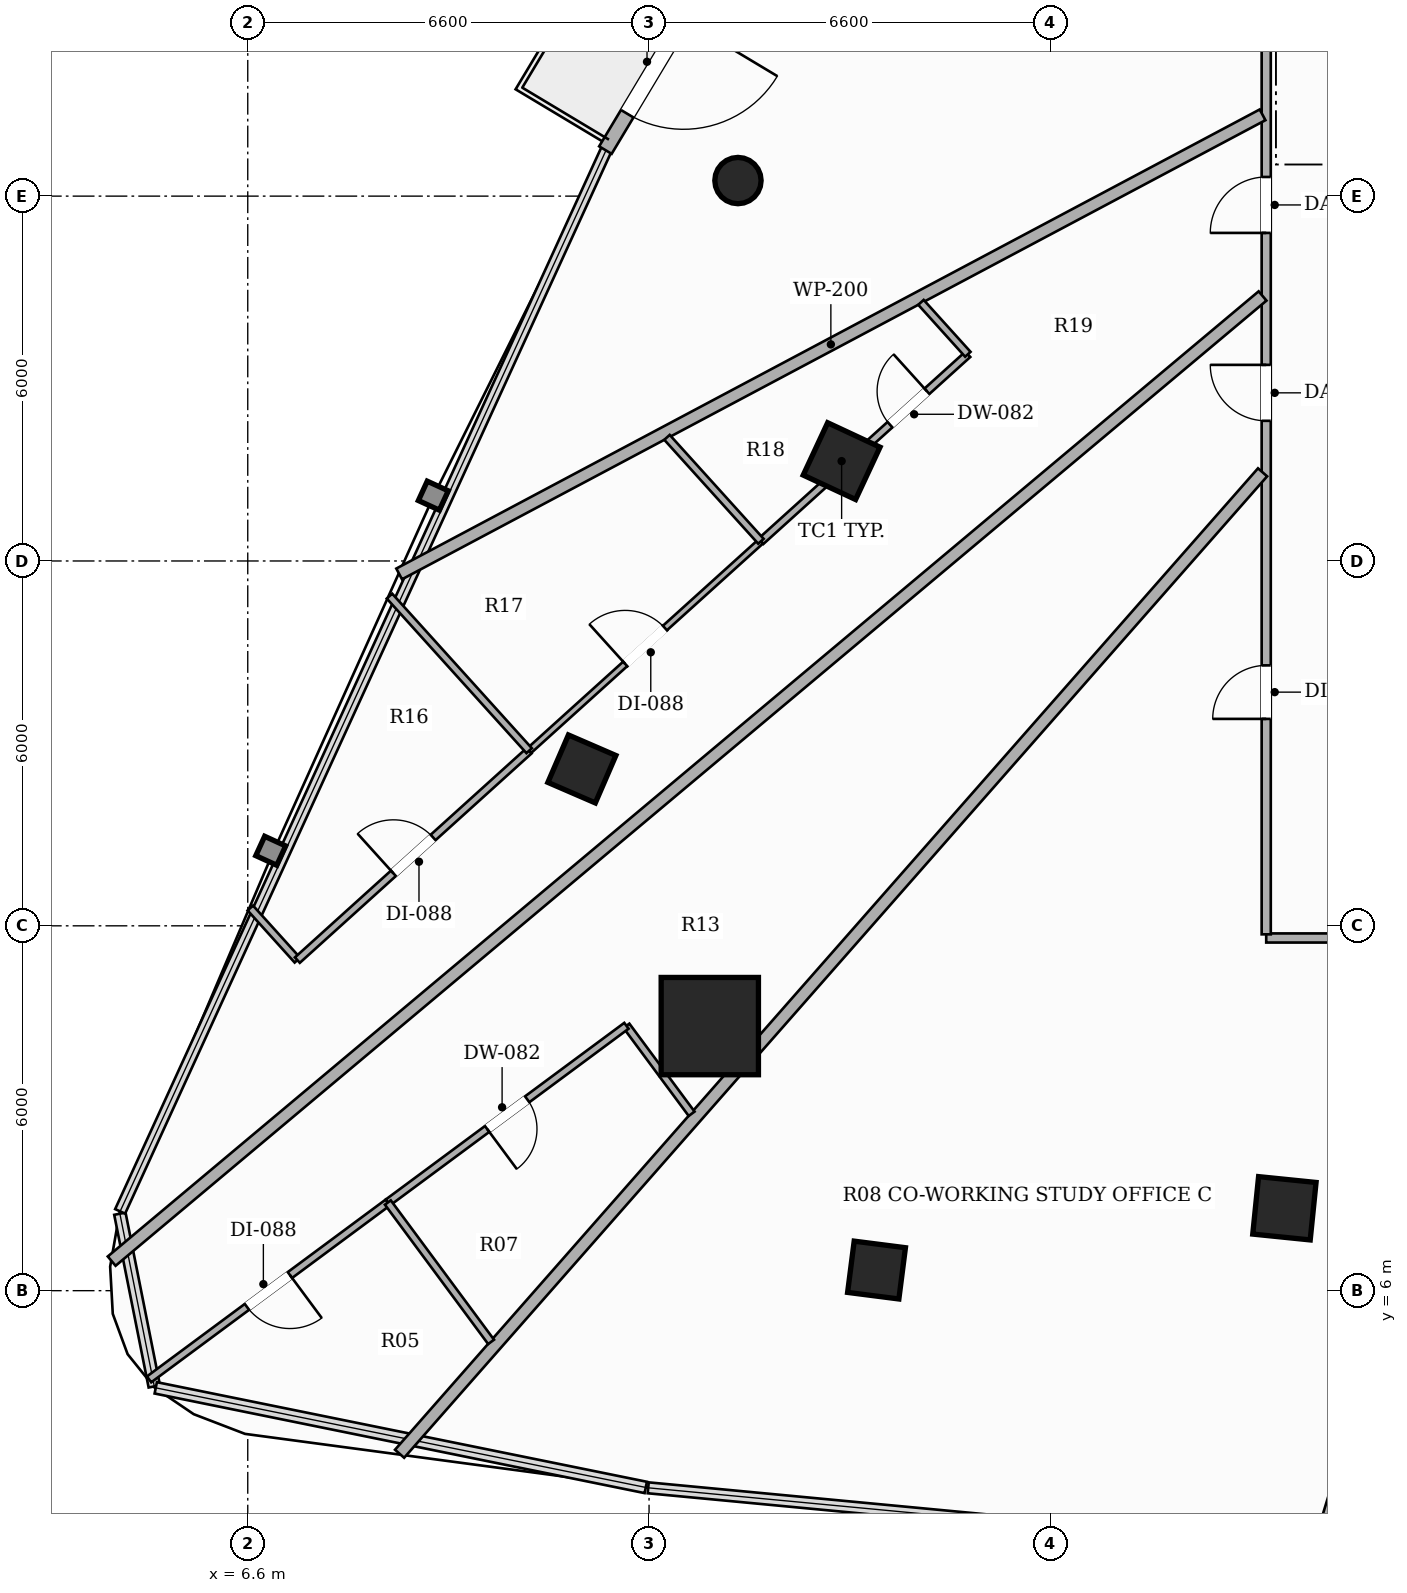
"""IFC4 building model, lengths in metres.
Left out: names, types, materials, properties, quantities, classifications, styles, units other than length and angle.
Written with IfcOpenShell. Run it as: python <this file> out.ifc"""

import sys

from ifc_helpers import new_model, si_unit, direction, frame, frame_2d, origin, origin_2d, place, context, subcontext, project, spatial, rectangle, hollow_rectangle, hollow_circle, extrude, element, fill, save


model = new_model("IFC4")
c1 = context("Model", 3, precision=1e-05, world=origin(), true_north=direction((0.0, 1.0)))
c2 = subcontext(c1, "Body", "Model", "MODEL_VIEW")
j1 = project(units=[si_unit("LENGTHUNIT", "METRE"), si_unit("PLANEANGLEUNIT", "RADIAN")], contexts=[c1])
p1 = place(None, origin())
s1 = spatial("IfcSite", under=j1, at=p1, CompositionType="ELEMENT")
p2 = place(p1, origin())
s2 = spatial("IfcBuilding", under=s1, at=p2, CompositionType="ELEMENT")
p3 = place(p2, frame((0.0, 0.0, 43.4)))
s3 = spatial("IfcBuildingStorey", under=s2, at=p3, CompositionType="ELEMENT", Elevation=43.4)
p4 = place(p3, frame((14.199, 10.351, 0.0), z_axis=(0.0, 0.0, 1.0), x_axis=(1.0, 0.0, 0.0)))
e1 = element("IfcColumn", 1, at=p4, inside=s3, PredefinedType="COLUMN", context=c2, shape_type="SweptSolid", body=[
    extrude(hollow_rectangle(XDim=1.6, YDim=1.6, WallThickness=0.05, at=origin_2d()), origin(), (0.0, 0.0, 1.0), 3.3),
])
for number, where, z_axis, x_axis in (
    (2, (16.367, 19.642, 0.0), (0.0, 0.0, 1.0), (0.423, 0.906, 0.0)),
    (3, (23.649, 7.355, 0.0), (0.0, 0.0, 1.0), (-0.995, 0.101, 0.0)),
):
    element("IfcColumn", number, at=place(p3, frame(where, z_axis=z_axis, x_axis=x_axis)), inside=s3, PredefinedType="COLUMN", context=c2, shape_type="SweptSolid", body=[
        extrude(hollow_rectangle(XDim=0.95, YDim=0.95, WallThickness=0.032, at=origin_2d()), origin(), (0.0, 0.0, 1.0), 3.3),
    ])
for number, where, z_axis, x_axis in (
    (4, (12.095, 14.58, 0.0), (0.0, 0.0, 1.0), (0.397, 0.918, 0.0)),
    (5, (16.941, 6.339, 0.0), (0.0, 0.0, 1.0), (-0.992, 0.127, 0.0)),
):
    element("IfcColumn", number, at=place(p3, frame(where, z_axis=z_axis, x_axis=x_axis)), inside=s3, PredefinedType="COLUMN", context=c2, shape_type="SweptSolid", body=[
        extrude(hollow_rectangle(XDim=0.85, YDim=0.85, WallThickness=0.028, at=origin_2d()), origin(), (0.0, 0.0, 1.0), 3.3),
    ])
p5 = place(p3, frame((14.662, 24.256, 0.0), z_axis=(0.0, 0.0, 1.0), x_axis=(1.0, 0.0, 0.0)))
e6 = element("IfcColumn", 6, at=p5, inside=s3, PredefinedType="COLUMN", context=c2, shape_type="SweptSolid", body=[
    extrude(hollow_circle(Radius=0.381, WallThickness=0.022, at=origin_2d()), origin(), (0.0, 0.0, 1.0), 3.3),
])
p6 = place(p3, frame((19.162, 35.896, 0.0), z_axis=(0.0, 0.0, 1.0), x_axis=(-0.514316069528, -0.857600711652, 0.0)))
e7 = element("IfcWall", 7, at=p6, inside=s3, PredefinedType="SOLIDWALL", context=c2, shape_type="SweptSolid", body=[
    extrude(rectangle(XDim=12.989, YDim=0.24, at=frame_2d((6.494, 0.0))), origin(), (0.0, 0.0, 1.0), 2.624),
])
p7 = place(p6, frame((10.491, 0.0, 0.0)))
e8 = element("IfcOpeningElement", 8, at=p7, cuts=e7, PredefinedType="OPENING", context=c2, shape_type="SweptSolid", body=[
    extrude(rectangle(XDim=1.8, YDim=2.2, at=frame_2d((0.9, 1.1))), frame((0.0, 0.13, 0.0), z_axis=(0.0, -1.0, 0.0), x_axis=(1.0, 0.0, 0.0)), (0.0, 0.0, 1.0), 0.26),
])
p8 = place(p3, frame((42.59, 11.8, 0.0), z_axis=(0.0, 0.0, 1.0), x_axis=(-1.0, 0.0, 0.0)))
e9 = element("IfcWall", 9, at=p8, inside=s3, PredefinedType="PARTITIONING", context=c2, shape_type="SweptSolid", body=[
    extrude(rectangle(XDim=19.24, YDim=0.15, at=frame_2d((9.62, 0.0))), origin(), (0.0, 0.0, 1.0), 2.669),
])
p9 = place(p8, frame((10.508, 0.0, 0.0)))
e10 = element("IfcOpeningElement", 10, at=p9, cuts=e9, PredefinedType="OPENING", context=c2, shape_type="SweptSolid", body=[
    extrude(rectangle(XDim=0.88, YDim=2.1, at=frame_2d((0.44, 1.05))), frame((0.0, 0.085, 0.0), z_axis=(0.0, -1.0, 0.0), x_axis=(1.0, 0.0, 0.0)), (0.0, 0.0, 1.0), 0.17),
])
p10 = place(p8, frame((2.98, 0.0, 0.0)))
e11 = element("IfcOpeningElement", 11, at=p10, cuts=e9, PredefinedType="OPENING", context=c2, shape_type="SweptSolid", body=[
    extrude(rectangle(XDim=0.92, YDim=2.15, at=frame_2d((0.46, 1.075))), frame((0.0, 0.085, 0.0), z_axis=(0.0, -1.0, 0.0), x_axis=(1.0, 0.0, 0.0)), (0.0, 0.0, 1.0), 0.17),
])
p11 = place(p3, frame((23.35, 11.86, 0.0), z_axis=(0.0, 0.0, 1.0), x_axis=(0.0, 1.0, 0.0)))
e12 = element("IfcWall", 12, at=p11, inside=s3, PredefinedType="PARTITIONING", context=c2, shape_type="SweptSolid", body=[
    extrude(rectangle(XDim=25.04, YDim=0.15, at=frame_2d((12.52, 0.0))), origin(), (0.0, 0.0, 1.0), 2.413),
])
p12 = place(p11, frame((18.67, 0.0, 0.0)))
e13 = element("IfcOpeningElement", 13, at=p12, cuts=e12, PredefinedType="OPENING", context=c2, shape_type="SweptSolid", body=[
    extrude(rectangle(XDim=0.88, YDim=2.1, at=frame_2d((0.44, 1.05))), frame((0.0, 0.085, 0.0), z_axis=(0.0, -1.0, 0.0), x_axis=(1.0, 0.0, 0.0)), (0.0, 0.0, 1.0), 0.17),
])
p13 = place(p11, frame((3.543, 0.0, 0.0)))
e14 = element("IfcOpeningElement", 14, at=p13, cuts=e12, PredefinedType="OPENING", context=c2, shape_type="SweptSolid", body=[
    extrude(rectangle(XDim=0.88, YDim=2.1, at=frame_2d((0.44, 1.05))), frame((0.0, 0.085, 0.0), z_axis=(0.0, -1.0, 0.0), x_axis=(1.0, 0.0, 0.0)), (0.0, 0.0, 1.0), 0.17),
])
p14 = place(p11, frame((8.445, 0.0, 0.0)))
e15 = element("IfcOpeningElement", 15, at=p14, cuts=e12, PredefinedType="OPENING", context=c2, shape_type="SweptSolid", body=[
    extrude(rectangle(XDim=0.92, YDim=2.15, at=frame_2d((0.46, 1.075))), frame((0.0, 0.085, 0.0), z_axis=(0.0, -1.0, 0.0), x_axis=(1.0, 0.0, 0.0)), (0.0, 0.0, 1.0), 0.17),
])
p15 = place(p11, frame((11.535, 0.0, 0.0)))
e16 = element("IfcOpeningElement", 16, at=p15, cuts=e12, PredefinedType="OPENING", context=c2, shape_type="SweptSolid", body=[
    extrude(rectangle(XDim=0.92, YDim=2.15, at=frame_2d((0.46, 1.075))), frame((0.0, 0.085, 0.0), z_axis=(0.0, -1.0, 0.0), x_axis=(1.0, 0.0, 0.0)), (0.0, 0.0, 1.0), 0.17),
])
p16 = place(p3, frame((23.29, 25.337, 0.0), z_axis=(0.0, 0.0, 1.0), x_axis=(-0.882959018112, -0.469450074379, 0.0)))
e17 = element("IfcWall", 17, at=p16, inside=s3, PredefinedType="PARTITIONING", context=c2, shape_type="SweptSolid", body=[
    extrude(rectangle(XDim=16.082, YDim=0.2, at=frame_2d((8.041, 0.0))), origin(), (0.0, 0.0, 1.0), 2.413),
])
p17 = place(p3, frame((27.264, 11.74, 0.0), z_axis=(0.0, 0.0, 1.0), x_axis=(-0.292294665238, -0.956328305904, 0.0)))
e18 = element("IfcWall", 18, at=p17, inside=s3, PredefinedType="PARTITIONING", context=c2, shape_type="SweptSolid", body=[
    extrude(rectangle(XDim=10.51, YDim=0.2, at=frame_2d((5.255, 0.0))), origin(), (0.0, 0.0, 1.0), 2.413),
])
p18 = place(p3, frame((9.097, 3.318, 0.0), z_axis=(0.0, 0.0, 1.0), x_axis=(0.66036589704, 0.750943993935, 0.0)))
e19 = element("IfcWall", 19, at=p18, inside=s3, PredefinedType="PARTITIONING", context=c2, shape_type="SweptSolid", body=[
    extrude(rectangle(XDim=21.493, YDim=0.2, at=frame_2d((10.747, 0.0))), origin(), (0.0, 0.0, 1.0), 2.413),
])
p19 = place(p3, frame((4.362, 6.486, 0.0), z_axis=(0.0, 0.0, 1.0), x_axis=(0.766256370513, 0.642534959865, 0.0)))
e20 = element("IfcWall", 20, at=p19, inside=s3, PredefinedType="PARTITIONING", context=c2, shape_type="SweptSolid", body=[
    extrude(rectangle(XDim=24.702, YDim=0.2, at=frame_2d((12.351, 0.0))), origin(), (0.0, 0.0, 1.0), 2.413),
])
p20 = place(p3, frame((13.9, 8.909, 0.0), z_axis=(0.0, 0.0, 1.0), x_axis=(-0.595282665334, 0.803516364708, 0.0)))
e21 = element("IfcWall", 21, at=p20, inside=s3, PredefinedType="PARTITIONING", context=c2, shape_type="SweptSolid", body=[
    extrude(rectangle(XDim=1.801, YDim=0.12, at=frame_2d((0.9, 0.0))), origin(), (0.0, 0.0, 1.0), 3.06),
])
p21 = place(p3, frame((12.828, 10.356, 0.0), z_axis=(0.0, 0.0, 1.0), x_axis=(-0.803609449498, -0.595156998344, 0.0)))
e22 = element("IfcWall", 22, at=p21, inside=s3, PredefinedType="PARTITIONING", context=c2, shape_type="SweptSolid", body=[
    extrude(rectangle(XDim=4.883, YDim=0.12, at=frame_2d((2.441, 0.0))), origin(), (0.0, 0.0, 1.0), 2.619),
])
p22 = place(p21, frame((2.031, 0.0, 0.0)))
e23 = element("IfcOpeningElement", 23, at=p22, cuts=e22, PredefinedType="OPENING", context=c2, shape_type="SweptSolid", body=[
    extrude(rectangle(XDim=0.82, YDim=2.1, at=frame_2d((0.41, 1.05))), frame((0.0, 0.07, 0.0), z_axis=(0.0, -1.0, 0.0), x_axis=(1.0, 0.0, 0.0)), (0.0, 0.0, 1.0), 0.14),
])
p23 = place(p3, frame((8.904, 7.45, 0.0), z_axis=(0.0, 0.0, 1.0), x_axis=(-0.803552768464, -0.595233524168, 0.0)))
e24 = element("IfcWall", 24, at=p23, inside=s3, PredefinedType="PARTITIONING", context=c2, shape_type="SweptSolid", body=[
    extrude(rectangle(XDim=4.887, YDim=0.12, at=frame_2d((2.443, 0.0))), origin(), (0.0, 0.0, 1.0), 3.06),
])
p24 = place(p23, frame((2.004, 0.0, 0.0)))
e25 = element("IfcOpeningElement", 25, at=p24, cuts=e24, PredefinedType="OPENING", context=c2, shape_type="SweptSolid", body=[
    extrude(rectangle(XDim=0.88, YDim=2.1, at=frame_2d((0.44, 1.05))), frame((0.0, 0.07, 0.0), z_axis=(0.0, -1.0, 0.0), x_axis=(1.0, 0.0, 0.0)), (0.0, 0.0, 1.0), 0.14),
])
p25 = place(p3, frame((10.602, 5.158, 0.0), z_axis=(0.0, 0.0, 1.0), x_axis=(-0.595278721497, 0.803519286472, 0.0)))
e26 = element("IfcWall", 26, at=p25, inside=s3, PredefinedType="PARTITIONING", context=c2, shape_type="SweptSolid", body=[
    extrude(rectangle(XDim=2.853, YDim=0.12, at=frame_2d((1.426, 0.0))), origin(), (0.0, 0.0, 1.0), 3.06),
])
p26 = place(p3, frame((15.04, 18.324, 0.0), z_axis=(0.0, 0.0, 1.0), x_axis=(0.741971948415, 0.670430926916, 0.0)))
e27 = element("IfcWall", 27, at=p26, inside=s3, PredefinedType="PARTITIONING", context=c2, shape_type="SweptSolid", body=[
    extrude(rectangle(XDim=4.586, YDim=0.12, at=frame_2d((2.293, 0.0))), origin(), (0.0, 0.0, 1.0), 2.413),
])
p27 = place(p26, frame((2.86, 0.0, 0.0)))
e28 = element("IfcOpeningElement", 28, at=p27, cuts=e27, PredefinedType="OPENING", context=c2, shape_type="SweptSolid", body=[
    extrude(rectangle(XDim=0.82, YDim=2.1, at=frame_2d((0.41, 1.05))), frame((0.0, 0.07, 0.0), z_axis=(0.0, -1.0, 0.0), x_axis=(1.0, 0.0, 0.0)), (0.0, 0.0, 1.0), 0.14),
])
p28 = place(p3, frame((18.443, 21.399, 0.0), z_axis=(0.0, 0.0, 1.0), x_axis=(-0.670112835353, 0.742259245746, 0.0)))
e29 = element("IfcWall", 29, at=p28, inside=s3, PredefinedType="PARTITIONING", context=c2, shape_type="SweptSolid", body=[
    extrude(rectangle(XDim=1.151, YDim=0.12, at=frame_2d((0.575, 0.0))), origin(), (0.0, 0.0, 1.0), 2.669),
])
p29 = place(p3, frame((6.642, 12.293, 0.0), z_axis=(0.0, 0.0, 1.0), x_axis=(0.670248695606, -0.742136568321, 0.0)))
e30 = element("IfcWall", 30, at=p29, inside=s3, PredefinedType="PARTITIONING", context=c2, shape_type="SweptSolid", body=[
    extrude(rectangle(XDim=1.155, YDim=0.12, at=frame_2d((0.577, 0.0))), origin(), (0.0, 0.0, 1.0), 2.619),
])
p30 = place(p3, frame((7.416, 11.436, 0.0), z_axis=(0.0, 0.0, 1.0), x_axis=(0.742030958457, 0.670365614192, 0.0)))
e31 = element("IfcWall", 31, at=p30, inside=s3, PredefinedType="PARTITIONING", context=c2, shape_type="SweptSolid", body=[
    extrude(rectangle(XDim=5.137, YDim=0.12, at=frame_2d((2.569, 0.0))), origin(), (0.0, 0.0, 1.0), 2.619),
])
p31 = place(p30, frame((2.129, 0.0, 0.0)))
e32 = element("IfcOpeningElement", 32, at=p31, cuts=e31, PredefinedType="OPENING", context=c2, shape_type="SweptSolid", body=[
    extrude(rectangle(XDim=0.88, YDim=2.1, at=frame_2d((0.44, 1.05))), frame((0.0, 0.07, 0.0), z_axis=(0.0, -1.0, 0.0), x_axis=(1.0, 0.0, 0.0)), (0.0, 0.0, 1.0), 0.14),
])
p32 = place(p3, frame((11.228, 14.88, 0.0), z_axis=(0.0, 0.0, 1.0), x_axis=(0.742007319068, 0.670391779819, 0.0)))
e33 = element("IfcWall", 33, at=p32, inside=s3, PredefinedType="PARTITIONING", context=c2, shape_type="SweptSolid", body=[
    extrude(rectangle(XDim=5.137, YDim=0.1, at=frame_2d((2.569, 0.0))), origin(), (0.0, 0.0, 1.0), 2.413),
])
p33 = place(p32, frame((2.129, 0.0, 0.0)))
e34 = element("IfcOpeningElement", 34, at=p33, cuts=e33, PredefinedType="OPENING", context=c2, shape_type="SweptSolid", body=[
    extrude(rectangle(XDim=0.88, YDim=2.1, at=frame_2d((0.44, 1.05))), frame((0.0, 0.06, 0.0), z_axis=(0.0, -1.0, 0.0), x_axis=(1.0, 0.0, 0.0)), (0.0, 0.0, 1.0), 0.12),
])
p34 = place(p3, frame((15.04, 18.324, 0.0), z_axis=(0.0, 0.0, 1.0), x_axis=(-0.670602478911, 0.741816901451, 0.0)))
e35 = element("IfcWall", 35, at=p34, inside=s3, PredefinedType="PARTITIONING", context=c2, shape_type="SweptSolid", body=[
    extrude(rectangle(XDim=2.304, YDim=0.12, at=frame_2d((1.152, 0.0))), origin(), (0.0, 0.0, 1.0), 2.413),
])
p35 = place(p3, frame((8.931, 17.422, 0.0), z_axis=(0.0, 0.0, 1.0), x_axis=(0.670431816202, -0.741971144873, 0.0)))
e36 = element("IfcWall", 36, at=p35, inside=s3, PredefinedType="PARTITIONING", context=c2, shape_type="SweptSolid", body=[
    extrude(rectangle(XDim=3.426, YDim=0.12, at=frame_2d((1.713, 0.0))), origin(), (0.0, 0.0, 1.0), 3.06),
])
p36 = place(p7, origin())
e37 = element("IfcDoor", 37, at=p36, inside=s3, OperationType="SINGLE_SWING_LEFT", PredefinedType="DOOR", context=c2, shape_type="SweptSolid", body=[
    extrude(rectangle(XDim=1.8, YDim=2.2, at=frame_2d((0.9, 1.1))), frame((0.0, 0.025, 0.0), z_axis=(0.0, -1.0, 0.0), x_axis=(1.0, 0.0, 0.0)), (0.0, 0.0, 1.0), 0.05),
])
fill(e8, e37)
p37 = place(p13, origin())
e38 = element("IfcDoor", 38, at=p37, inside=s3, OperationType="SINGLE_SWING_LEFT", PredefinedType="DOOR", context=c2, shape_type="SweptSolid", body=[
    extrude(rectangle(XDim=0.88, YDim=2.1, at=frame_2d((0.44, 1.05))), frame((0.0, 0.025, 0.0), z_axis=(0.0, -1.0, 0.0), x_axis=(1.0, 0.0, 0.0)), (0.0, 0.0, 1.0), 0.05),
])
fill(e14, e38)
p38 = place(p14, origin())
e39 = element("IfcDoor", 39, at=p38, inside=s3, OperationType="SINGLE_SWING_RIGHT", PredefinedType="DOOR", context=c2, shape_type="SweptSolid", body=[
    extrude(rectangle(XDim=0.92, YDim=2.15, at=frame_2d((0.46, 1.075))), frame((0.0, 0.025, 0.0), z_axis=(0.0, -1.0, 0.0), x_axis=(1.0, 0.0, 0.0)), (0.0, 0.0, 1.0), 0.05),
])
fill(e15, e39)
p39 = place(p22, origin())
e40 = element("IfcDoor", 40, at=p39, inside=s3, OperationType="SINGLE_SWING_RIGHT", PredefinedType="DOOR", context=c2, shape_type="SweptSolid", body=[
    extrude(rectangle(XDim=0.82, YDim=2.1, at=frame_2d((0.41, 1.05))), frame((0.0, 0.025, 0.0), z_axis=(0.0, -1.0, 0.0), x_axis=(1.0, 0.0, 0.0)), (0.0, 0.0, 1.0), 0.05),
])
fill(e23, e40)
p40 = place(p24, origin())
e41 = element("IfcDoor", 41, at=p40, inside=s3, OperationType="SINGLE_SWING_LEFT", PredefinedType="DOOR", context=c2, shape_type="SweptSolid", body=[
    extrude(rectangle(XDim=0.88, YDim=2.1, at=frame_2d((0.44, 1.05))), frame((0.0, 0.025, 0.0), z_axis=(0.0, -1.0, 0.0), x_axis=(1.0, 0.0, 0.0)), (0.0, 0.0, 1.0), 0.05),
])
fill(e25, e41)
p41 = place(p15, origin())
e42 = element("IfcDoor", 42, at=p41, inside=s3, OperationType="SINGLE_SWING_LEFT", PredefinedType="DOOR", context=c2, shape_type="SweptSolid", body=[
    extrude(rectangle(XDim=0.92, YDim=2.15, at=frame_2d((0.46, 1.075))), frame((0.0, 0.025, 0.0), z_axis=(0.0, -1.0, 0.0), x_axis=(1.0, 0.0, 0.0)), (0.0, 0.0, 1.0), 0.05),
])
fill(e16, e42)
p42 = place(p27, origin())
e43 = element("IfcDoor", 43, at=p42, inside=s3, OperationType="SINGLE_SWING_RIGHT", PredefinedType="DOOR", context=c2, shape_type="SweptSolid", body=[
    extrude(rectangle(XDim=0.82, YDim=2.1, at=frame_2d((0.41, 1.05))), frame((0.0, 0.025, 0.0), z_axis=(0.0, -1.0, 0.0), x_axis=(1.0, 0.0, 0.0)), (0.0, 0.0, 1.0), 0.05),
])
fill(e28, e43)
p43 = place(p31, origin())
e44 = element("IfcDoor", 44, at=p43, inside=s3, OperationType="SINGLE_SWING_LEFT", PredefinedType="DOOR", context=c2, shape_type="SweptSolid", body=[
    extrude(rectangle(XDim=0.88, YDim=2.1, at=frame_2d((0.44, 1.05))), frame((0.0, 0.025, 0.0), z_axis=(0.0, -1.0, 0.0), x_axis=(1.0, 0.0, 0.0)), (0.0, 0.0, 1.0), 0.05),
])
fill(e32, e44)
p44 = place(p33, origin())
e45 = element("IfcDoor", 45, at=p44, inside=s3, OperationType="SINGLE_SWING_LEFT", PredefinedType="DOOR", context=c2, shape_type="SweptSolid", body=[
    extrude(rectangle(XDim=0.88, YDim=2.1, at=frame_2d((0.44, 1.05))), frame((0.0, 0.025, 0.0), z_axis=(0.0, -1.0, 0.0), x_axis=(1.0, 0.0, 0.0)), (0.0, 0.0, 1.0), 0.05),
])
fill(e34, e45)
save(model, sys.argv[1])
